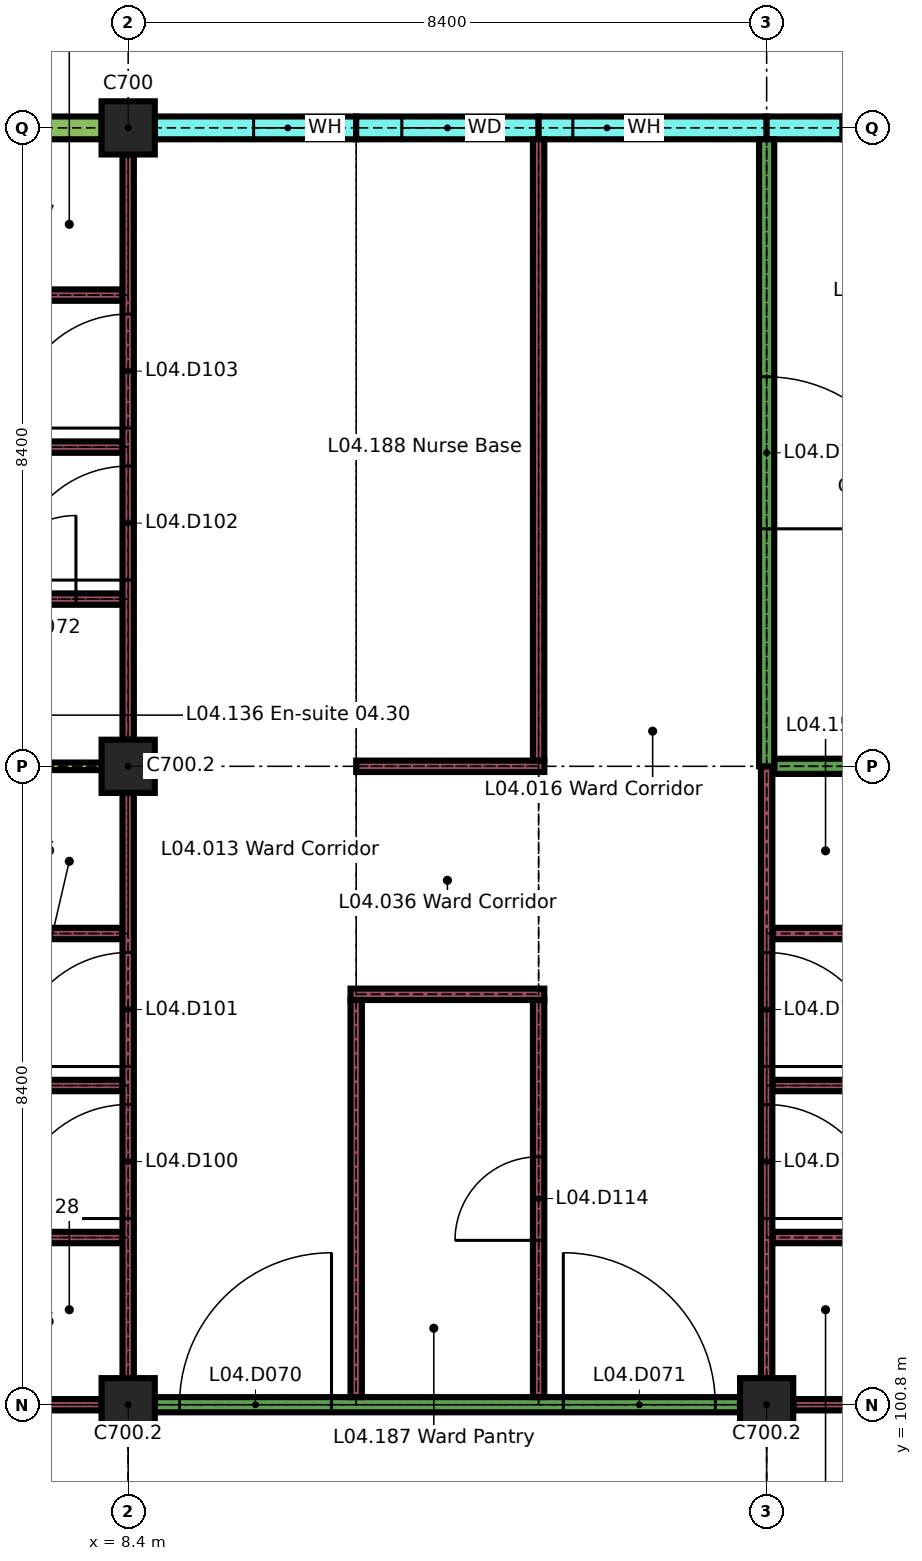
"""IFC4 building model, lengths in metres.
Left out: names, types, materials, properties, quantities, classifications, styles, units other than length and angle.
Written with IfcOpenShell. Run it as: python <this file> out.ifc"""

import sys

from ifc_helpers import new_model, si_unit, direction, frame, frame_2d, origin, origin_2d, place, context, subcontext, project, spatial, rectangle, extrude, element, fill, save


model = new_model("IFC4")
c1 = context("Model", 3, precision=1e-05, world=origin(), true_north=direction((0.0, 1.0)))
c2 = subcontext(c1, "Body", "Model", "MODEL_VIEW")
j1 = project(units=[si_unit("LENGTHUNIT", "METRE"), si_unit("PLANEANGLEUNIT", "RADIAN")], contexts=[c1])
p1 = place(None, origin())
s1 = spatial("IfcSite", under=j1, at=p1, CompositionType="ELEMENT")
p2 = place(p1, origin())
s2 = spatial("IfcBuilding", under=s1, at=p2, CompositionType="ELEMENT")
p3 = place(p2, frame((0.0, 0.0, 18.9)))
s3 = spatial("IfcBuildingStorey", under=s2, at=p3, CompositionType="ELEMENT", Elevation=18.9)
for number, where, z_axis, x_axis in (
    (1, (8.4, 100.8, 0.0), (0.0, 0.0, 1.0), (1.0, 0.0, 0.0)),
    (2, (16.8, 100.8, 0.0), (0.0, 0.0, 1.0), (1.0, 0.0, 0.0)),
    (3, (8.4, 109.2, 0.0), (0.0, 0.0, 1.0), (1.0, 0.0, 0.0)),
    (4, (8.4, 117.6, 0.0), (0.0, 0.0, 1.0), (1.0, 0.0, 0.0)),
):
    element("IfcColumn", number, at=place(p3, frame(where, z_axis=z_axis, x_axis=x_axis)), inside=s3, PredefinedType="COLUMN", context=c2, shape_type="SweptSolid", body=[
        extrude(rectangle(XDim=0.7, YDim=0.7, at=origin_2d()), origin(), (0.0, 0.0, 1.0), 3.26),
    ])
p4 = place(p3, frame((6.0, 117.6, 0.0), z_axis=(0.0, 0.0, 1.0), x_axis=(1.0, 0.0, 0.0)))
e5 = element("IfcWall", 5, at=p4, inside=s3, PredefinedType="SOLIDWALL", context=c2, shape_type="SweptSolid", body=[
    extrude(rectangle(XDim=2.05, YDim=0.3, at=frame_2d((1.025, 0.0))), origin(), (0.0, 0.0, 1.0), 2.96),
])
p5 = place(p3, frame((8.75, 117.6, 0.0), z_axis=(0.0, 0.0, 1.0), x_axis=(1.0, 0.0, 0.0)))
e6 = element("IfcWall", 6, at=p5, inside=s3, PredefinedType="SOLIDWALL", context=c2, shape_type="SweptSolid", body=[
    extrude(rectangle(XDim=2.65, YDim=0.3, at=frame_2d((1.325, 0.0))), origin(), (0.0, 0.0, 1.0), 3.26),
])
p6 = place(p5, frame((1.3, 0.0, 0.9)))
e7 = element("IfcOpeningElement", 7, at=p6, cuts=e6, PredefinedType="OPENING", context=c2, shape_type="SweptSolid", body=[
    extrude(rectangle(XDim=0.9, YDim=1.5, at=frame_2d((0.45, 0.75))), frame((0.0, 0.16, 0.0), z_axis=(0.0, -1.0, 0.0), x_axis=(1.0, 0.0, 0.0)), (0.0, 0.0, 1.0), 0.32),
])
p7 = place(p3, frame((11.4, 117.6, 0.0), z_axis=(0.0, 0.0, 1.0), x_axis=(1.0, 0.0, 0.0)))
e8 = element("IfcWall", 8, at=p7, inside=s3, PredefinedType="SOLIDWALL", context=c2, shape_type="SweptSolid", body=[
    extrude(rectangle(XDim=2.4, YDim=0.3, at=frame_2d((1.2, 0.0))), origin(), (0.0, 0.0, 1.0), 3.26),
])
p8 = place(p7, frame((0.6, 0.0, 0.9)))
e9 = element("IfcOpeningElement", 9, at=p8, cuts=e8, PredefinedType="OPENING", context=c2, shape_type="SweptSolid", body=[
    extrude(rectangle(XDim=1.2, YDim=1.5, at=frame_2d((0.6, 0.75))), frame((0.0, 0.16, 0.0), z_axis=(0.0, -1.0, 0.0), x_axis=(1.0, 0.0, 0.0)), (0.0, 0.0, 1.0), 0.32),
])
p9 = place(p3, frame((13.8, 117.6, 0.0), z_axis=(0.0, 0.0, 1.0), x_axis=(1.0, 0.0, 0.0)))
e10 = element("IfcWall", 10, at=p9, inside=s3, PredefinedType="SOLIDWALL", context=c2, shape_type="SweptSolid", body=[
    extrude(rectangle(XDim=3.0, YDim=0.3, at=frame_2d((1.5, 0.0))), origin(), (0.0, 0.0, 1.0), 3.26),
])
p10 = place(p9, frame((0.45, 0.0, 0.9)))
e11 = element("IfcOpeningElement", 11, at=p10, cuts=e10, PredefinedType="OPENING", context=c2, shape_type="SweptSolid", body=[
    extrude(rectangle(XDim=0.9, YDim=1.5, at=frame_2d((0.45, 0.75))), frame((0.0, 0.16, 0.0), z_axis=(0.0, -1.0, 0.0), x_axis=(1.0, 0.0, 0.0)), (0.0, 0.0, 1.0), 0.32),
])
p11 = place(p3, frame((16.8, 117.6, 0.0), z_axis=(0.0, 0.0, 1.0), x_axis=(1.0, 0.0, 0.0)))
e12 = element("IfcWall", 12, at=p11, inside=s3, PredefinedType="SOLIDWALL", context=c2, shape_type="SweptSolid", body=[
    extrude(rectangle(XDim=1.0, YDim=0.3, at=frame_2d((0.5, 0.0))), origin(), (0.0, 0.0, 1.0), 3.26),
])
p12 = place(p3, frame((17.8, 117.6, 0.0), z_axis=(0.0, 0.0, 1.0), x_axis=(1.0, 0.0, 0.0)))
e13 = element("IfcWall", 13, at=p12, inside=s3, PredefinedType="SOLIDWALL", context=c2, shape_type="SweptSolid", body=[
    extrude(rectangle(XDim=2.8, YDim=0.3, at=frame_2d((1.4, 0.0))), origin(), (0.0, 0.0, 1.0), 0.6),
])
p13 = place(p3, frame((0.35, 100.8, 0.0), z_axis=(0.0, 0.0, 1.0), x_axis=(1.0, 0.0, 0.0)))
e14 = element("IfcWall", 14, at=p13, inside=s3, PredefinedType="PARTITIONING", context=c2, shape_type="SweptSolid", body=[
    extrude(rectangle(XDim=7.7, YDim=0.15, at=frame_2d((3.85, 0.0))), origin(), (0.0, 0.0, 1.0), 3.26),
])
p14 = place(p3, frame((8.75, 100.8, 0.0), z_axis=(0.0, 0.0, 1.0), x_axis=(1.0, 0.0, 0.0)))
e15 = element("IfcWall", 15, at=p14, inside=s3, PredefinedType="PARTITIONING", context=c2, shape_type="SweptSolid", body=[
    extrude(rectangle(XDim=7.7, YDim=0.2, at=frame_2d((3.85, 0.0))), origin(), (0.0, 0.0, 1.0), 3.26),
])
p15 = place(p14, frame((0.325, 0.0, 0.0)))
e16 = element("IfcOpeningElement", 16, at=p15, cuts=e15, PredefinedType="OPENING", context=c2, shape_type="SweptSolid", body=[
    extrude(rectangle(XDim=2.0, YDim=2.4, at=frame_2d((1.0, 1.2))), frame((0.0, 0.11, 0.0), z_axis=(0.0, -1.0, 0.0), x_axis=(1.0, 0.0, 0.0)), (0.0, 0.0, 1.0), 0.22),
])
p16 = place(p14, frame((5.375, 0.0, 0.0)))
e17 = element("IfcOpeningElement", 17, at=p16, cuts=e15, PredefinedType="OPENING", context=c2, shape_type="SweptSolid", body=[
    extrude(rectangle(XDim=2.0, YDim=2.4, at=frame_2d((1.0, 1.2))), frame((0.0, 0.11, 0.0), z_axis=(0.0, -1.0, 0.0), x_axis=(1.0, 0.0, 0.0)), (0.0, 0.0, 1.0), 0.22),
])
p17 = place(p3, frame((17.15, 100.8, 0.0), z_axis=(0.0, 0.0, 1.0), x_axis=(1.0, 0.0, 0.0)))
e18 = element("IfcWall", 18, at=p17, inside=s3, PredefinedType="PARTITIONING", context=c2, shape_type="SweptSolid", body=[
    extrude(rectangle(XDim=7.7, YDim=0.15, at=frame_2d((3.85, 0.0))), origin(), (0.0, 0.0, 1.0), 3.26),
])
for number, where, z_axis, x_axis in (
    (19, (5.925, 103.0, 0.0), (0.0, 0.0, 1.0), (1.0, 0.0, 0.0)),
    (20, (16.875, 103.0, 0.0), (0.0, 0.0, 1.0), (1.0, 0.0, 0.0)),
):
    element("IfcWall", number, at=place(p3, frame(where, z_axis=z_axis, x_axis=x_axis)), inside=s3, PredefinedType="PARTITIONING", context=c2, shape_type="SweptSolid", body=[
        extrude(rectangle(XDim=2.4, YDim=0.15, at=frame_2d((1.2, 0.0))), origin(), (0.0, 0.0, 1.0), 3.26),
    ])
for number, where, z_axis, x_axis in (
    (21, (0.15, 105.0, 0.0), (0.0, 0.0, 1.0), (1.0, 0.0, 0.0)),
    (22, (16.875, 105.0, 0.0), (0.0, 0.0, 1.0), (1.0, 0.0, 0.0)),
):
    element("IfcWall", number, at=place(p3, frame(where, z_axis=z_axis, x_axis=x_axis)), inside=s3, PredefinedType="PARTITIONING", context=c2, shape_type="SweptSolid", body=[
        extrude(rectangle(XDim=8.175, YDim=0.15, at=frame_2d((4.087, 0.0))), origin(), (0.0, 0.0, 1.0), 3.26),
    ])
p18 = place(p3, frame((11.325, 106.2, 0.0), z_axis=(0.0, 0.0, 1.0), x_axis=(1.0, 0.0, 0.0)))
e23 = element("IfcWall", 23, at=p18, inside=s3, PredefinedType="PARTITIONING", context=c2, shape_type="SweptSolid", body=[
    extrude(rectangle(XDim=2.55, YDim=0.15, at=frame_2d((1.275, 0.0))), origin(), (0.0, 0.0, 1.0), 3.26),
])
for number, where, z_axis, x_axis in (
    (24, (5.925, 107.0, 0.0), (0.0, 0.0, 1.0), (1.0, 0.0, 0.0)),
    (25, (16.875, 107.0, 0.0), (0.0, 0.0, 1.0), (1.0, 0.0, 0.0)),
):
    element("IfcWall", number, at=place(p3, frame(where, z_axis=z_axis, x_axis=x_axis)), inside=s3, PredefinedType="PARTITIONING", context=c2, shape_type="SweptSolid", body=[
        extrude(rectangle(XDim=2.4, YDim=0.15, at=frame_2d((1.2, 0.0))), origin(), (0.0, 0.0, 1.0), 3.26),
    ])
p19 = place(p3, frame((6.0, 109.2, 0.0), z_axis=(0.0, 0.0, 1.0), x_axis=(1.0, 0.0, 0.0)))
e26 = element("IfcWall", 26, at=p19, inside=s3, PredefinedType="PARTITIONING", context=c2, shape_type="SweptSolid", body=[
    extrude(rectangle(XDim=2.05, YDim=0.1, at=frame_2d((1.025, 0.0))), origin(), (0.0, 0.0, 1.0), 3.26),
])
p20 = place(p3, frame((11.4, 109.2, 0.0), z_axis=(0.0, 0.0, 1.0), x_axis=(1.0, 0.0, 0.0)))
e27 = element("IfcWall", 27, at=p20, inside=s3, PredefinedType="PARTITIONING", context=c2, shape_type="SweptSolid", body=[
    extrude(rectangle(XDim=2.475, YDim=0.15, at=frame_2d((1.238, 0.0))), origin(), (0.0, 0.0, 1.0), 3.26),
])
p21 = place(p3, frame((16.9, 109.2, 0.0), z_axis=(0.0, 0.0, 1.0), x_axis=(1.0, 0.0, 0.0)))
e28 = element("IfcWall", 28, at=p21, inside=s3, PredefinedType="PARTITIONING", context=c2, shape_type="SweptSolid", body=[
    extrude(rectangle(XDim=4.7, YDim=0.2, at=frame_2d((2.35, 0.0))), origin(), (0.0, 0.0, 1.0), 3.26),
])
p22 = place(p3, frame((5.925, 111.4, 0.0), z_axis=(0.0, 0.0, 1.0), x_axis=(1.0, 0.0, 0.0)))
e29 = element("IfcWall", 29, at=p22, inside=s3, PredefinedType="PARTITIONING", context=c2, shape_type="SweptSolid", body=[
    extrude(rectangle(XDim=2.4, YDim=0.15, at=frame_2d((1.2, 0.0))), origin(), (0.0, 0.0, 1.0), 3.26),
])
p23 = place(p22, frame((0.688, 0.0, 0.0)))
e30 = element("IfcOpeningElement", 30, at=p23, cuts=e29, PredefinedType="OPENING", context=c2, shape_type="SweptSolid", body=[
    extrude(rectangle(XDim=1.1, YDim=2.1, at=frame_2d((0.55, 1.05))), frame((0.0, 0.085, 0.0), z_axis=(0.0, -1.0, 0.0), x_axis=(1.0, 0.0, 0.0)), (0.0, 0.0, 1.0), 0.17),
])
p24 = place(p3, frame((0.15, 113.4, 0.0), z_axis=(0.0, 0.0, 1.0), x_axis=(1.0, 0.0, 0.0)))
e31 = element("IfcWall", 31, at=p24, inside=s3, PredefinedType="PARTITIONING", context=c2, shape_type="SweptSolid", body=[
    extrude(rectangle(XDim=8.175, YDim=0.15, at=frame_2d((4.087, 0.0))), origin(), (0.0, 0.0, 1.0), 3.26),
])
p25 = place(p3, frame((5.925, 115.4, 0.0), z_axis=(0.0, 0.0, 1.0), x_axis=(1.0, 0.0, 0.0)))
e32 = element("IfcWall", 32, at=p25, inside=s3, PredefinedType="PARTITIONING", context=c2, shape_type="SweptSolid", body=[
    extrude(rectangle(XDim=2.4, YDim=0.15, at=frame_2d((1.2, 0.0))), origin(), (0.0, 0.0, 1.0), 3.26),
])
p26 = place(p3, frame((8.4, 101.15, 0.0), z_axis=(0.0, 0.0, 1.0), x_axis=(0.0, 1.0, 0.0)))
e33 = element("IfcWall", 33, at=p26, inside=s3, PredefinedType="PARTITIONING", context=c2, shape_type="SweptSolid", body=[
    extrude(rectangle(XDim=7.7, YDim=0.15, at=frame_2d((3.85, 0.0))), origin(), (0.0, 0.0, 1.0), 3.26),
])
p27 = place(p26, frame((2.1, 0.0, 0.0)))
e34 = element("IfcOpeningElement", 34, at=p27, cuts=e33, PredefinedType="OPENING", context=c2, shape_type="SweptSolid", body=[
    extrude(rectangle(XDim=1.5, YDim=2.4, at=frame_2d((0.75, 1.2))), frame((0.0, 0.085, 0.0), z_axis=(0.0, -1.0, 0.0), x_axis=(1.0, 0.0, 0.0)), (0.0, 0.0, 1.0), 0.17),
])
p28 = place(p26, frame((4.1, 0.0, 0.0)))
e35 = element("IfcOpeningElement", 35, at=p28, cuts=e33, PredefinedType="OPENING", context=c2, shape_type="SweptSolid", body=[
    extrude(rectangle(XDim=1.5, YDim=2.4, at=frame_2d((0.75, 1.2))), frame((0.0, 0.085, 0.0), z_axis=(0.0, -1.0, 0.0), x_axis=(1.0, 0.0, 0.0)), (0.0, 0.0, 1.0), 0.17),
])
p29 = place(p3, frame((8.4, 109.55, 0.0), z_axis=(0.0, 0.0, 1.0), x_axis=(0.0, 1.0, 0.0)))
e36 = element("IfcWall", 36, at=p29, inside=s3, PredefinedType="PARTITIONING", context=c2, shape_type="SweptSolid", body=[
    extrude(rectangle(XDim=7.7, YDim=0.15, at=frame_2d((3.85, 0.0))), origin(), (0.0, 0.0, 1.0), 3.26),
])
p30 = place(p29, frame((2.1, 0.0, 0.0)))
e37 = element("IfcOpeningElement", 37, at=p30, cuts=e36, PredefinedType="OPENING", context=c2, shape_type="SweptSolid", body=[
    extrude(rectangle(XDim=1.5, YDim=2.4, at=frame_2d((0.75, 1.2))), frame((0.0, 0.085, 0.0), z_axis=(0.0, -1.0, 0.0), x_axis=(1.0, 0.0, 0.0)), (0.0, 0.0, 1.0), 0.17),
])
p31 = place(p29, frame((4.1, 0.0, 0.0)))
e38 = element("IfcOpeningElement", 38, at=p31, cuts=e36, PredefinedType="OPENING", context=c2, shape_type="SweptSolid", body=[
    extrude(rectangle(XDim=1.5, YDim=2.4, at=frame_2d((0.75, 1.2))), frame((0.0, 0.085, 0.0), z_axis=(0.0, -1.0, 0.0), x_axis=(1.0, 0.0, 0.0)), (0.0, 0.0, 1.0), 0.17),
])
p32 = place(p3, frame((11.4, 100.9, 0.0), z_axis=(0.0, 0.0, 1.0), x_axis=(0.0, 1.0, 0.0)))
e39 = element("IfcWall", 39, at=p32, inside=s3, PredefinedType="PARTITIONING", context=c2, shape_type="SweptSolid", body=[
    extrude(rectangle(XDim=5.225, YDim=0.15, at=frame_2d((2.613, 0.0))), origin(), (0.0, 0.0, 1.0), 3.26),
])
p33 = place(p3, frame((13.8, 100.9, 0.0), z_axis=(0.0, 0.0, 1.0), x_axis=(0.0, 1.0, 0.0)))
e40 = element("IfcWall", 40, at=p33, inside=s3, PredefinedType="PARTITIONING", context=c2, shape_type="SweptSolid", body=[
    extrude(rectangle(XDim=5.225, YDim=0.15, at=frame_2d((2.613, 0.0))), origin(), (0.0, 0.0, 1.0), 3.26),
])
p34 = place(p33, frame((2.062, 0.0, 0.0)))
e41 = element("IfcOpeningElement", 41, at=p34, cuts=e40, PredefinedType="OPENING", context=c2, shape_type="SweptSolid", body=[
    extrude(rectangle(XDim=1.1, YDim=2.1, at=frame_2d((0.55, 1.05))), frame((0.0, 0.085, 0.0), z_axis=(0.0, -1.0, 0.0), x_axis=(1.0, 0.0, 0.0)), (0.0, 0.0, 1.0), 0.17),
])
p35 = place(p3, frame((13.8, 109.275, 0.0), z_axis=(0.0, 0.0, 1.0), x_axis=(0.0, 1.0, 0.0)))
e42 = element("IfcWall", 42, at=p35, inside=s3, PredefinedType="PARTITIONING", context=c2, shape_type="SweptSolid", body=[
    extrude(rectangle(XDim=8.175, YDim=0.15, at=frame_2d((4.087, 0.0))), origin(), (0.0, 0.0, 1.0), 3.26),
])
p36 = place(p3, frame((16.8, 101.15, 0.0), z_axis=(0.0, 0.0, 1.0), x_axis=(0.0, 1.0, 0.0)))
e43 = element("IfcWall", 43, at=p36, inside=s3, PredefinedType="PARTITIONING", context=c2, shape_type="SweptSolid", body=[
    extrude(rectangle(XDim=8.05, YDim=0.15, at=frame_2d((4.025, 0.0))), origin(), (0.0, 0.0, 1.0), 3.26),
])
p37 = place(p36, frame((2.1, 0.0, 0.0)))
e44 = element("IfcOpeningElement", 44, at=p37, cuts=e43, PredefinedType="OPENING", context=c2, shape_type="SweptSolid", body=[
    extrude(rectangle(XDim=1.5, YDim=2.4, at=frame_2d((0.75, 1.2))), frame((0.0, 0.085, 0.0), z_axis=(0.0, -1.0, 0.0), x_axis=(1.0, 0.0, 0.0)), (0.0, 0.0, 1.0), 0.17),
])
p38 = place(p36, frame((4.1, 0.0, 0.0)))
e45 = element("IfcOpeningElement", 45, at=p38, cuts=e43, PredefinedType="OPENING", context=c2, shape_type="SweptSolid", body=[
    extrude(rectangle(XDim=1.5, YDim=2.4, at=frame_2d((0.75, 1.2))), frame((0.0, 0.085, 0.0), z_axis=(0.0, -1.0, 0.0), x_axis=(1.0, 0.0, 0.0)), (0.0, 0.0, 1.0), 0.17),
])
p39 = place(p3, frame((16.8, 109.2, 0.0), z_axis=(0.0, 0.0, 1.0), x_axis=(0.0, 1.0, 0.0)))
e46 = element("IfcWall", 46, at=p39, inside=s3, PredefinedType="PARTITIONING", context=c2, shape_type="SweptSolid", body=[
    extrude(rectangle(XDim=8.25, YDim=0.2, at=frame_2d((4.125, 0.0))), origin(), (0.0, 0.0, 1.0), 3.26),
])
p40 = place(p39, frame((3.125, 0.0, 0.0)))
e47 = element("IfcOpeningElement", 47, at=p40, cuts=e46, PredefinedType="OPENING", context=c2, shape_type="SweptSolid", body=[
    extrude(rectangle(XDim=2.0, YDim=2.4, at=frame_2d((1.0, 1.2))), frame((0.0, 0.11, 0.0), z_axis=(0.0, -1.0, 0.0), x_axis=(1.0, 0.0, 0.0)), (0.0, 0.0, 1.0), 0.22),
])
p41 = place(p6, origin())
e48 = element("IfcWindow", 48, at=p41, inside=s3, PartitioningType="SINGLE_PANEL", PredefinedType="WINDOW", context=c2, shape_type="SweptSolid", body=[
    extrude(rectangle(XDim=0.9, YDim=1.5, at=frame_2d((0.45, 0.75))), frame((0.0, 0.03, 0.0), z_axis=(0.0, -1.0, 0.0), x_axis=(1.0, 0.0, 0.0)), (0.0, 0.0, 1.0), 0.06),
])
fill(e7, e48)
p42 = place(p8, origin())
e49 = element("IfcWindow", 49, at=p42, inside=s3, PartitioningType="SINGLE_PANEL", PredefinedType="WINDOW", context=c2, shape_type="SweptSolid", body=[
    extrude(rectangle(XDim=1.2, YDim=1.5, at=frame_2d((0.6, 0.75))), frame((0.0, 0.03, 0.0), z_axis=(0.0, -1.0, 0.0), x_axis=(1.0, 0.0, 0.0)), (0.0, 0.0, 1.0), 0.06),
])
fill(e9, e49)
p43 = place(p10, origin())
e50 = element("IfcWindow", 50, at=p43, inside=s3, PartitioningType="SINGLE_PANEL", PredefinedType="WINDOW", context=c2, shape_type="SweptSolid", body=[
    extrude(rectangle(XDim=0.9, YDim=1.5, at=frame_2d((0.45, 0.75))), frame((0.0, 0.03, 0.0), z_axis=(0.0, -1.0, 0.0), x_axis=(1.0, 0.0, 0.0)), (0.0, 0.0, 1.0), 0.06),
])
fill(e11, e50)
p44 = place(p15, origin())
e51 = element("IfcDoor", 51, at=p44, inside=s3, OperationType="SINGLE_SWING_LEFT", PredefinedType="DOOR", context=c2, shape_type="SweptSolid", body=[
    extrude(rectangle(XDim=2.0, YDim=2.4, at=frame_2d((1.0, 1.2))), frame((0.0, 0.03, 0.0), z_axis=(0.0, -1.0, 0.0), x_axis=(1.0, 0.0, 0.0)), (0.0, 0.0, 1.0), 0.06),
])
fill(e16, e51)
p45 = place(p16, origin())
e52 = element("IfcDoor", 52, at=p45, inside=s3, OperationType="SINGLE_SWING_RIGHT", PredefinedType="DOOR", context=c2, shape_type="SweptSolid", body=[
    extrude(rectangle(XDim=2.0, YDim=2.4, at=frame_2d((1.0, 1.2))), frame((0.0, 0.03, 0.0), z_axis=(0.0, -1.0, 0.0), x_axis=(1.0, 0.0, 0.0)), (0.0, 0.0, 1.0), 0.06),
])
fill(e17, e52)
p46 = place(p23, origin())
e53 = element("IfcDoor", 53, at=p46, inside=s3, OperationType="SINGLE_SWING_LEFT", PredefinedType="DOOR", context=c2, shape_type="SweptSolid", body=[
    extrude(rectangle(XDim=1.1, YDim=2.1, at=frame_2d((0.55, 1.05))), frame((0.0, 0.025, 0.0), z_axis=(0.0, -1.0, 0.0), x_axis=(1.0, 0.0, 0.0)), (0.0, 0.0, 1.0), 0.05),
])
fill(e30, e53)
p47 = place(p27, origin())
e54 = element("IfcDoor", 54, at=p47, inside=s3, OperationType="SINGLE_SWING_RIGHT", PredefinedType="DOOR", context=c2, shape_type="SweptSolid", body=[
    extrude(rectangle(XDim=1.5, YDim=2.4, at=frame_2d((0.75, 1.2))), frame((0.0, 0.03, 0.0), z_axis=(0.0, -1.0, 0.0), x_axis=(1.0, 0.0, 0.0)), (0.0, 0.0, 1.0), 0.06),
])
fill(e34, e54)
p48 = place(p28, origin())
e55 = element("IfcDoor", 55, at=p48, inside=s3, OperationType="SINGLE_SWING_RIGHT", PredefinedType="DOOR", context=c2, shape_type="SweptSolid", body=[
    extrude(rectangle(XDim=1.5, YDim=2.4, at=frame_2d((0.75, 1.2))), frame((0.0, 0.03, 0.0), z_axis=(0.0, -1.0, 0.0), x_axis=(1.0, 0.0, 0.0)), (0.0, 0.0, 1.0), 0.06),
])
fill(e35, e55)
p49 = place(p30, origin())
e56 = element("IfcDoor", 56, at=p49, inside=s3, OperationType="SINGLE_SWING_RIGHT", PredefinedType="DOOR", context=c2, shape_type="SweptSolid", body=[
    extrude(rectangle(XDim=1.5, YDim=2.4, at=frame_2d((0.75, 1.2))), frame((0.0, 0.03, 0.0), z_axis=(0.0, -1.0, 0.0), x_axis=(1.0, 0.0, 0.0)), (0.0, 0.0, 1.0), 0.06),
])
fill(e37, e56)
p50 = place(p31, origin())
e57 = element("IfcDoor", 57, at=p50, inside=s3, OperationType="SINGLE_SWING_RIGHT", PredefinedType="DOOR", context=c2, shape_type="SweptSolid", body=[
    extrude(rectangle(XDim=1.5, YDim=2.4, at=frame_2d((0.75, 1.2))), frame((0.0, 0.03, 0.0), z_axis=(0.0, -1.0, 0.0), x_axis=(1.0, 0.0, 0.0)), (0.0, 0.0, 1.0), 0.06),
])
fill(e38, e57)
p51 = place(p34, origin())
e58 = element("IfcDoor", 58, at=p51, inside=s3, OperationType="SINGLE_SWING_RIGHT", PredefinedType="DOOR", context=c2, shape_type="SweptSolid", body=[
    extrude(rectangle(XDim=1.1, YDim=2.1, at=frame_2d((0.55, 1.05))), frame((0.0, 0.025, 0.0), z_axis=(0.0, -1.0, 0.0), x_axis=(1.0, 0.0, 0.0)), (0.0, 0.0, 1.0), 0.05),
])
fill(e41, e58)
p52 = place(p37, origin())
e59 = element("IfcDoor", 59, at=p52, inside=s3, OperationType="SINGLE_SWING_LEFT", PredefinedType="DOOR", context=c2, shape_type="SweptSolid", body=[
    extrude(rectangle(XDim=1.5, YDim=2.4, at=frame_2d((0.75, 1.2))), frame((0.0, 0.03, 0.0), z_axis=(0.0, -1.0, 0.0), x_axis=(1.0, 0.0, 0.0)), (0.0, 0.0, 1.0), 0.06),
])
fill(e44, e59)
p53 = place(p38, origin())
e60 = element("IfcDoor", 60, at=p53, inside=s3, OperationType="SINGLE_SWING_LEFT", PredefinedType="DOOR", context=c2, shape_type="SweptSolid", body=[
    extrude(rectangle(XDim=1.5, YDim=2.4, at=frame_2d((0.75, 1.2))), frame((0.0, 0.03, 0.0), z_axis=(0.0, -1.0, 0.0), x_axis=(1.0, 0.0, 0.0)), (0.0, 0.0, 1.0), 0.06),
])
fill(e45, e60)
p54 = place(p40, origin())
e61 = element("IfcDoor", 61, at=p54, inside=s3, OperationType="SINGLE_SWING_LEFT", PredefinedType="DOOR", context=c2, shape_type="SweptSolid", body=[
    extrude(rectangle(XDim=2.0, YDim=2.4, at=frame_2d((1.0, 1.2))), frame((0.0, 0.03, 0.0), z_axis=(0.0, -1.0, 0.0), x_axis=(1.0, 0.0, 0.0)), (0.0, 0.0, 1.0), 0.06),
])
fill(e47, e61)
save(model, sys.argv[1])
